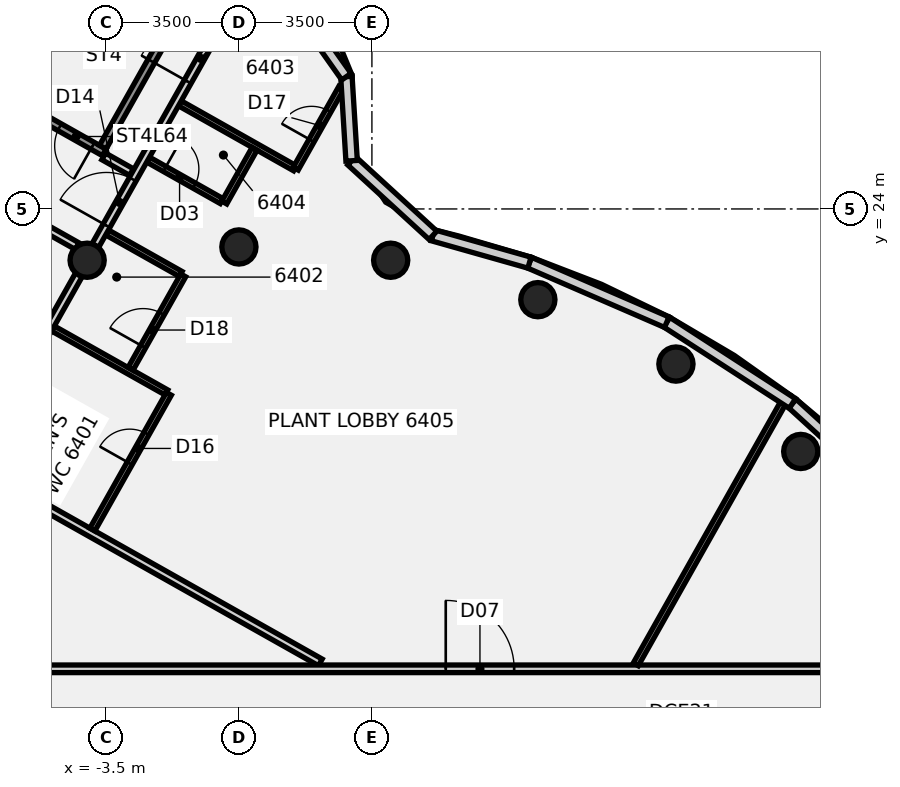
"""IFC4 building model, lengths in metres.
Left out: names, types, materials, properties, quantities, classifications, styles, units other than length and angle.
Written with IfcOpenShell. Run it as: python <this file> out.ifc"""

import sys

from ifc_helpers import new_model, si_unit, direction, frame, frame_2d, origin, origin_2d, place, context, subcontext, project, spatial, rectangle, circle, extrude, element, fill, save


model = new_model("IFC4")
c1 = context("Model", 3, precision=1e-05, world=origin(), true_north=direction((0.0, 1.0)))
c2 = subcontext(c1, "Body", "Model", "MODEL_VIEW")
j1 = project(units=[si_unit("LENGTHUNIT", "METRE"), si_unit("PLANEANGLEUNIT", "RADIAN")], contexts=[c1])
p1 = place(None, origin())
s1 = spatial("IfcSite", under=j1, at=p1, CompositionType="ELEMENT")
p2 = place(p1, origin())
s2 = spatial("IfcBuilding", under=s1, at=p2, CompositionType="ELEMENT")
p3 = place(p2, frame((0.0, 0.0, 252.3)))
s3 = spatial("IfcBuildingStorey", under=s2, at=p3, CompositionType="ELEMENT", Elevation=252.3)
for number, where, z_axis, x_axis in (
    (1, (14.784, 17.619, -0.18), (0.0, 0.0, 1.0), (1.0, 0.0, 0.0)),
    (2, (11.5, 19.919, -0.18), (0.0, 0.0, 1.0), (1.0, 0.0, 0.0)),
    (3, (7.866, 21.613, -0.18), (0.0, 0.0, 1.0), (1.0, 0.0, 0.0)),
    (4, (3.994, 22.651, -0.18), (0.0, 0.0, 1.0), (1.0, 0.0, 0.0)),
    (5, (0.0, 23.0, -0.18), (0.0, 0.0, 1.0), (1.0, 0.0, 0.0)),
    (6, (-3.994, 22.651, -0.18), (0.0, 0.0, 1.0), (1.0, 0.0, 0.0)),
):
    element("IfcColumn", number, at=place(p3, frame(where, z_axis=z_axis, x_axis=x_axis)), inside=s3, PredefinedType="COLUMN", context=c2, shape_type="SweptSolid", body=[
        extrude(circle(Radius=0.45, at=origin_2d()), origin(), (0.0, 0.0, 1.0), 4.54),
    ])
p4 = place(p3, frame((-11.373, 19.686, 0.0), z_axis=(0.0, 0.0, 1.0), x_axis=(0.871198713454, -0.490930546693, 0.0)))
e7 = element("IfcWall", 7, at=p4, inside=s3, PredefinedType="PARTITIONING", context=c2, shape_type="SweptSolid", body=[
    extrude(rectangle(XDim=15.514, YDim=0.2, at=frame_2d((7.757, 0.0))), origin(), (0.0, 0.0, 1.0), 3.66),
])
p5 = place(p3, frame((-7.733, 24.98, 0.0), z_axis=(0.0, 0.0, 1.0), x_axis=(0.871188339902, -0.490948955003, 0.0)))
e8 = element("IfcWall", 8, at=p5, inside=s3, PredefinedType="PARTITIONING", context=c2, shape_type="SweptSolid", body=[
    extrude(rectangle(XDim=3.994, YDim=0.2, at=frame_2d((1.997, 0.0))), origin(), (0.0, 0.0, 1.0), 3.66),
])
p6 = place(p5, frame((1.55, 0.0, 0.0)))
e9 = element("IfcOpeningElement", 9, at=p6, cuts=e8, PredefinedType="OPENING", context=c2, shape_type="SweptSolid", body=[
    extrude(rectangle(XDim=1.4, YDim=2.1, at=frame_2d((0.7, 1.05))), frame((0.0, 0.11, 0.0), z_axis=(0.0, -1.0, 0.0), x_axis=(1.0, 0.0, 0.0)), (0.0, 0.0, 1.0), 0.22),
])
p7 = place(p3, frame((-4.893, 20.854, 0.0), z_axis=(0.0, 0.0, 1.0), x_axis=(0.871287977001, -0.490772107127, 0.0)))
e10 = element("IfcWall", 10, at=p7, inside=s3, PredefinedType="PARTITIONING", context=c2, shape_type="SweptSolid", body=[
    extrude(rectangle(XDim=3.426, YDim=0.15, at=frame_2d((1.713, 0.0))), origin(), (0.0, 0.0, 1.0), 3.66),
])
p8 = place(p3, frame((-3.558, 25.382, 0.0), z_axis=(0.0, 0.0, 1.0), x_axis=(0.87131936668, -0.490716375566, 0.0)))
e11 = element("IfcWall", 11, at=p8, inside=s3, PredefinedType="PARTITIONING", context=c2, shape_type="SweptSolid", body=[
    extrude(rectangle(XDim=0.84, YDim=0.2, at=frame_2d((0.42, 0.0))), origin(), (0.0, 0.0, 1.0), 3.66),
])
p9 = place(p3, frame((-3.469, 23.381, 0.0), z_axis=(0.0, 0.0, 1.0), x_axis=(0.871285294393, -0.490776869641, 0.0)))
e12 = element("IfcWall", 12, at=p9, inside=s3, PredefinedType="PARTITIONING", context=c2, shape_type="SweptSolid", body=[
    extrude(rectangle(XDim=2.225, YDim=0.15, at=frame_2d((1.113, 0.0))), origin(), (0.0, 0.0, 1.0), 3.66),
])
p10 = place(p3, frame((-2.389, 25.298, 0.0), z_axis=(0.0, 0.0, 1.0), x_axis=(0.871090637824, -0.491122286906, 0.0)))
e13 = element("IfcWall", 13, at=p10, inside=s3, PredefinedType="PARTITIONING", context=c2, shape_type="SweptSolid", body=[
    extrude(rectangle(XDim=2.22, YDim=0.15, at=frame_2d((1.11, 0.0))), origin(), (0.0, 0.0, 1.0), 3.66),
])
p11 = place(p10, frame((0.5, 0.0, 0.0)))
e14 = element("IfcOpeningElement", 14, at=p11, cuts=e13, PredefinedType="OPENING", context=c2, shape_type="SweptSolid", body=[
    extrude(rectangle(XDim=0.9, YDim=2.1, at=frame_2d((0.45, 1.05))), frame((0.0, 0.085, 0.0), z_axis=(0.0, -1.0, 0.0), x_axis=(1.0, 0.0, 0.0)), (0.0, 0.0, 1.0), 0.17),
])
p12 = place(p3, frame((-1.554, 26.779, 0.0), z_axis=(0.0, 0.0, 1.0), x_axis=(0.870988474872, -0.491303446599, 0.0)))
e15 = element("IfcWall", 15, at=p12, inside=s3, PredefinedType="PARTITIONING", context=c2, shape_type="SweptSolid", body=[
    extrude(rectangle(XDim=3.48, YDim=0.15, at=frame_2d((1.74, 0.0))), origin(), (0.0, 0.0, 1.0), 3.66),
])
p13 = place(p3, frame((-17.065, 11.9, 0.0), z_axis=(0.0, 0.0, 1.0), x_axis=(1.0, 0.0, 0.0)))
e16 = element("IfcWall", 16, at=p13, inside=s3, PredefinedType="PARTITIONING", context=c2, shape_type="SweptSolid", body=[
    extrude(rectangle(XDim=34.165, YDim=0.2, at=frame_2d((17.083, 0.0))), origin(), (0.0, 0.0, 1.0), 3.66),
])
p14 = place(p13, frame((22.508, 0.0, 0.0)))
e17 = element("IfcOpeningElement", 17, at=p14, cuts=e16, PredefinedType="OPENING", context=c2, shape_type="SweptSolid", body=[
    extrude(rectangle(XDim=1.8, YDim=2.1, at=frame_2d((0.9, 1.05))), frame((0.0, 0.11, 0.0), z_axis=(0.0, -1.0, 0.0), x_axis=(1.0, 0.0, 0.0)), (0.0, 0.0, 1.0), 0.22),
])
p15 = place(p13, frame((10.115, 0.0, 0.0)))
e18 = element("IfcOpeningElement", 18, at=p15, cuts=e16, PredefinedType="OPENING", context=c2, shape_type="SweptSolid", body=[
    extrude(rectangle(XDim=1.8, YDim=2.1, at=frame_2d((0.9, 1.05))), frame((0.0, 0.11, 0.0), z_axis=(0.0, -1.0, 0.0), x_axis=(1.0, 0.0, 0.0)), (0.0, 0.0, 1.0), 0.22),
])
p16 = place(p3, frame((-6.983, 17.348, 0.0), z_axis=(0.0, 0.0, 1.0), x_axis=(0.490949267778, 0.871188163641, 0.0)))
e19 = element("IfcWall", 19, at=p16, inside=s3, PredefinedType="PARTITIONING", context=c2, shape_type="SweptSolid", body=[
    extrude(rectangle(XDim=5.862, YDim=0.2, at=frame_2d((2.931, 0.0))), origin(), (0.0, 0.0, 1.0), 3.66),
])
p17 = place(p3, frame((-3.885, 22.847, 0.0), z_axis=(0.0, 0.0, 1.0), x_axis=(0.490960829695, 0.871181647939, 0.0)))
e20 = element("IfcWall", 20, at=p17, inside=s3, PredefinedType="PARTITIONING", context=c2, shape_type="SweptSolid", body=[
    extrude(rectangle(XDim=7.868, YDim=0.2, at=frame_2d((3.934, 0.0))), origin(), (0.0, 0.0, 1.0), 3.66),
])
p18 = place(p17, frame((0.819, 0.0, 0.0)))
e21 = element("IfcOpeningElement", 21, at=p18, cuts=e20, PredefinedType="OPENING", context=c2, shape_type="SweptSolid", body=[
    extrude(rectangle(XDim=1.4, YDim=2.1, at=frame_2d((0.7, 1.05))), frame((0.0, 0.11, 0.0), z_axis=(0.0, -1.0, 0.0), x_axis=(1.0, 0.0, 0.0)), (0.0, 0.0, 1.0), 0.22),
])
p19 = place(p17, frame((5.17, 0.0, 0.0)))
e22 = element("IfcOpeningElement", 22, at=p19, cuts=e20, PredefinedType="OPENING", context=c2, shape_type="SweptSolid", body=[
    extrude(rectangle(XDim=1.4, YDim=2.1, at=frame_2d((0.7, 1.05))), frame((0.0, 0.11, 0.0), z_axis=(0.0, -1.0, 0.0), x_axis=(1.0, 0.0, 0.0)), (0.0, 0.0, 1.0), 0.22),
])
p20 = place(p3, frame((-3.856, 15.564, 0.0), z_axis=(0.0, 0.0, 1.0), x_axis=(0.49096787186, 0.871177679237, 0.0)))
e23 = element("IfcWall", 23, at=p20, inside=s3, PredefinedType="PARTITIONING", context=c2, shape_type="SweptSolid", body=[
    extrude(rectangle(XDim=4.1, YDim=0.15, at=frame_2d((2.05, 0.0))), origin(), (0.0, 0.0, 1.0), 3.66),
])
p21 = place(p20, frame((2.0, 0.0, 0.0)))
e24 = element("IfcOpeningElement", 24, at=p21, cuts=e23, PredefinedType="OPENING", context=c2, shape_type="SweptSolid", body=[
    extrude(rectangle(XDim=0.9, YDim=2.1, at=frame_2d((0.45, 1.05))), frame((0.0, 0.085, 0.0), z_axis=(0.0, -1.0, 0.0), x_axis=(1.0, 0.0, 0.0)), (0.0, 0.0, 1.0), 0.17),
])
p22 = place(p3, frame((1.495, 25.06, 0.0), z_axis=(0.0, 0.0, 1.0), x_axis=(0.490981386235, 0.87117006283, 0.0)))
e25 = element("IfcWall", 25, at=p22, inside=s3, PredefinedType="PARTITIONING", context=c2, shape_type="SweptSolid", body=[
    extrude(rectangle(XDim=2.446, YDim=0.15, at=frame_2d((1.223, 0.0))), origin(), (0.0, 0.0, 1.0), 3.66),
])
p23 = place(p22, frame((0.85, 0.0, 0.0)))
e26 = element("IfcOpeningElement", 26, at=p23, cuts=e25, PredefinedType="OPENING", context=c2, shape_type="SweptSolid", body=[
    extrude(rectangle(XDim=0.9, YDim=2.1, at=frame_2d((0.45, 1.05))), frame((0.0, 0.085, 0.0), z_axis=(0.0, -1.0, 0.0), x_axis=(1.0, 0.0, 0.0)), (0.0, 0.0, 1.0), 0.17),
])
p24 = place(p3, frame((-2.85, 19.795, 0.0), z_axis=(0.0, 0.0, 1.0), x_axis=(0.490881675971, 0.871226250865, 0.0)))
e27 = element("IfcWall", 27, at=p24, inside=s3, PredefinedType="PARTITIONING", context=c2, shape_type="SweptSolid", body=[
    extrude(rectangle(XDim=2.821, YDim=0.15, at=frame_2d((1.41, 0.0))), origin(), (0.0, 0.0, 1.0), 3.66),
])
p25 = place(p24, frame((0.67, 0.0, 0.0)))
e28 = element("IfcOpeningElement", 28, at=p25, cuts=e27, PredefinedType="OPENING", context=c2, shape_type="SweptSolid", body=[
    extrude(rectangle(XDim=1.0, YDim=2.1, at=frame_2d((0.5, 1.05))), frame((0.0, 0.085, 0.0), z_axis=(0.0, -1.0, 0.0), x_axis=(1.0, 0.0, 0.0)), (0.0, 0.0, 1.0), 0.17),
])
p26 = place(p3, frame((-0.385, 24.168, 0.0), z_axis=(0.0, 0.0, 1.0), x_axis=(0.490967443079, 0.871177920884, 0.0)))
e29 = element("IfcWall", 29, at=p26, inside=s3, PredefinedType="PARTITIONING", context=c2, shape_type="SweptSolid", body=[
    extrude(rectangle(XDim=1.625, YDim=0.15, at=frame_2d((0.812, 0.0))), origin(), (0.0, 0.0, 1.0), 3.66),
])
p27 = place(p3, frame((10.444, 12.018, 0.0), z_axis=(0.0, 0.0, 1.0), x_axis=(0.490955299431, 0.871184764537, 0.0)))
e30 = element("IfcWall", 30, at=p27, inside=s3, PredefinedType="PARTITIONING", context=c2, shape_type="SweptSolid", body=[
    extrude(rectangle(XDim=8.165, YDim=0.15, at=frame_2d((4.083, 0.0))), origin(), (0.0, 0.0, 1.0), 3.66),
])
p28 = place(p3, frame((17.474, 16.226, 0.0), z_axis=(0.0, 0.0, 1.0), x_axis=(-0.738634435884, 0.674106200926, 0.0)))
e31 = element("IfcWall", 31, at=p28, inside=s3, PredefinedType="SOLIDWALL", context=c2, shape_type="SweptSolid", body=[
    extrude(rectangle(XDim=3.938, YDim=0.3, at=frame_2d((1.969, 0.0))), origin(), (0.0, 0.0, 1.0), 4.36),
])
p29 = place(p3, frame((14.565, 18.881, 0.0), z_axis=(0.0, 0.0, 1.0), x_axis=(-0.839498632024, 0.54336180104, 0.0)))
e32 = element("IfcWall", 32, at=p29, inside=s3, PredefinedType="SOLIDWALL", context=c2, shape_type="SweptSolid", body=[
    extrude(rectangle(XDim=3.938, YDim=0.3, at=frame_2d((1.969, 0.0))), origin(), (0.0, 0.0, 1.0), 4.36),
])
p30 = place(p3, frame((11.259, 21.021, 0.0), z_axis=(0.0, 0.0, 1.0), x_axis=(-0.917505110173, 0.397723990735, 0.0)))
e33 = element("IfcWall", 33, at=p30, inside=s3, PredefinedType="SOLIDWALL", context=c2, shape_type="SweptSolid", body=[
    extrude(rectangle(XDim=3.938, YDim=0.3, at=frame_2d((1.969, 0.0))), origin(), (0.0, 0.0, 1.0), 4.36),
])
p31 = place(p3, frame((7.646, 22.587, 0.0), z_axis=(0.0, 0.0, 1.0), x_axis=(-0.962160288524, 0.272484089788, 0.0)))
e34 = element("IfcWall", 34, at=p31, inside=s3, PredefinedType="SOLIDWALL", context=c2, shape_type="SweptSolid", body=[
    extrude(rectangle(XDim=2.639, YDim=0.3, at=frame_2d((1.319, 0.0))), origin(), (0.0, 0.0, 1.0), 4.36),
])
p32 = place(p3, frame((5.107, 23.306, 0.0), z_axis=(0.0, 0.0, 1.0), x_axis=(-0.737248359807, 0.675621829104, 0.0)))
e35 = element("IfcWall", 35, at=p32, inside=s3, PredefinedType="SOLIDWALL", context=c2, shape_type="SweptSolid", body=[
    extrude(rectangle(XDim=2.904, YDim=0.3, at=frame_2d((1.452, 0.0))), origin(), (0.0, 0.0, 1.0), 4.36),
])
p33 = place(p3, frame((2.966, 25.268, 0.0), z_axis=(0.0, 0.0, 1.0), x_axis=(-0.061658520666, 0.998097303287, 0.0)))
e36 = element("IfcWall", 36, at=p33, inside=s3, PredefinedType="SOLIDWALL", context=c2, shape_type="SweptSolid", body=[
    extrude(rectangle(XDim=2.217, YDim=0.3, at=frame_2d((1.109, 0.0))), origin(), (0.0, 0.0, 1.0), 4.36),
])
p34 = place(p3, frame((2.829, 27.481, 0.0), z_axis=(0.0, 0.0, 1.0), x_axis=(-0.577459771893, 0.816419139808, 0.0)))
e37 = element("IfcWall", 37, at=p34, inside=s3, PredefinedType="SOLIDWALL", context=c2, shape_type="SweptSolid", body=[
    extrude(rectangle(XDim=1.604, YDim=0.3, at=frame_2d((0.802, 0.0))), origin(), (0.0, 0.0, 1.0), 4.36),
])
p35 = place(p3, frame((-3.544, 25.489, -0.18), z_axis=(0.0, 0.0, 1.0), x_axis=(-0.871189898328, 0.490946189567, 0.0)))
e38 = element("IfcWall", 38, at=p35, inside=s3, PredefinedType="SHEAR", context=c2, shape_type="SweptSolid", body=[
    extrude(rectangle(XDim=6.7, YDim=0.2, at=frame_2d((3.35, 0.0))), origin(), (0.0, 0.0, 1.0), 3.944),
])
p36 = place(p35, frame((0.35, 0.0, 0.0)))
e39 = element("IfcOpeningElement", 39, at=p36, cuts=e38, PredefinedType="OPENING", context=c2, shape_type="SweptSolid", body=[
    extrude(rectangle(XDim=1.0, YDim=2.1, at=frame_2d((0.5, 1.05))), frame((0.0, 0.11, 0.0), z_axis=(0.0, -1.0, 0.0), x_axis=(1.0, 0.0, 0.0)), (0.0, 0.0, 1.0), 0.22),
])
p37 = place(p3, frame((-2.01, 28.413, -0.18), z_axis=(0.0, 0.0, 1.0), x_axis=(-0.490945688221, -0.871190180854, 0.0)))
e40 = element("IfcWall", 40, at=p37, inside=s3, PredefinedType="SHEAR", context=c2, shape_type="SweptSolid", body=[
    extrude(rectangle(XDim=3.2, YDim=0.2, at=frame_2d((1.6, 0.0))), origin(), (0.0, 0.0, 1.0), 4.54),
])
p38 = place(p11, origin())
e41 = element("IfcDoor", 41, at=p38, inside=s3, OperationType="SINGLE_SWING_RIGHT", PredefinedType="DOOR", context=c2, shape_type="SweptSolid", body=[
    extrude(rectangle(XDim=0.9, YDim=2.1, at=frame_2d((0.45, 1.05))), frame((0.0, 0.025, 0.0), z_axis=(0.0, -1.0, 0.0), x_axis=(1.0, 0.0, 0.0)), (0.0, 0.0, 1.0), 0.05),
])
fill(e14, e41)
p39 = place(p14, frame((1.8, 0.0, 0.0), z_axis=(0.0, 0.0, 1.0), x_axis=(-1.0, 0.0, 0.0)))
e42 = element("IfcDoor", 42, at=p39, inside=s3, OperationType="DOUBLE_DOOR_SINGLE_SWING", PredefinedType="DOOR", context=c2, shape_type="SweptSolid", body=[
    extrude(rectangle(XDim=1.8, YDim=2.1, at=frame_2d((0.9, 1.05))), frame((0.0, 0.025, 0.0), z_axis=(0.0, -1.0, 0.0), x_axis=(1.0, 0.0, 0.0)), (0.0, 0.0, 1.0), 0.05),
])
fill(e17, e42)
p40 = place(p18, frame((1.4, 0.0, 0.0), z_axis=(0.0, 0.0, 1.0), x_axis=(-1.0, 0.0, 0.0)))
e43 = element("IfcDoor", 43, at=p40, inside=s3, OperationType="DOUBLE_DOOR_SINGLE_SWING", PredefinedType="DOOR", context=c2, shape_type="SweptSolid", body=[
    extrude(rectangle(XDim=1.4, YDim=2.1, at=frame_2d((0.7, 1.05))), frame((0.0, 0.025, 0.0), z_axis=(0.0, -1.0, 0.0), x_axis=(1.0, 0.0, 0.0)), (0.0, 0.0, 1.0), 0.05),
])
fill(e21, e43)
p41 = place(p19, origin())
e44 = element("IfcDoor", 44, at=p41, inside=s3, OperationType="DOUBLE_DOOR_SINGLE_SWING", PredefinedType="DOOR", context=c2, shape_type="SweptSolid", body=[
    extrude(rectangle(XDim=1.4, YDim=2.1, at=frame_2d((0.7, 1.05))), frame((0.0, 0.025, 0.0), z_axis=(0.0, -1.0, 0.0), x_axis=(1.0, 0.0, 0.0)), (0.0, 0.0, 1.0), 0.05),
])
fill(e22, e44)
p42 = place(p21, origin())
e45 = element("IfcDoor", 45, at=p42, inside=s3, OperationType="SINGLE_SWING_LEFT", PredefinedType="DOOR", context=c2, shape_type="SweptSolid", body=[
    extrude(rectangle(XDim=0.9, YDim=2.1, at=frame_2d((0.45, 1.05))), frame((0.0, 0.025, 0.0), z_axis=(0.0, -1.0, 0.0), x_axis=(1.0, 0.0, 0.0)), (0.0, 0.0, 1.0), 0.05),
])
fill(e24, e45)
p43 = place(p23, origin())
e46 = element("IfcDoor", 46, at=p43, inside=s3, OperationType="SINGLE_SWING_LEFT", PredefinedType="DOOR", context=c2, shape_type="SweptSolid", body=[
    extrude(rectangle(XDim=0.9, YDim=2.1, at=frame_2d((0.45, 1.05))), frame((0.0, 0.025, 0.0), z_axis=(0.0, -1.0, 0.0), x_axis=(1.0, 0.0, 0.0)), (0.0, 0.0, 1.0), 0.05),
])
fill(e26, e46)
p44 = place(p25, origin())
e47 = element("IfcDoor", 47, at=p44, inside=s3, OperationType="SINGLE_SWING_RIGHT", PredefinedType="DOOR", context=c2, shape_type="SweptSolid", body=[
    extrude(rectangle(XDim=1.0, YDim=2.1, at=frame_2d((0.5, 1.05))), frame((0.0, 0.025, 0.0), z_axis=(0.0, -1.0, 0.0), x_axis=(1.0, 0.0, 0.0)), (0.0, 0.0, 1.0), 0.05),
])
fill(e28, e47)
p45 = place(p36, origin())
e48 = element("IfcDoor", 48, at=p45, inside=s3, OperationType="SINGLE_SWING_LEFT", PredefinedType="DOOR", context=c2, shape_type="SweptSolid", body=[
    extrude(rectangle(XDim=1.0, YDim=2.1, at=frame_2d((0.5, 1.05))), frame((0.0, 0.025, 0.0), z_axis=(0.0, -1.0, 0.0), x_axis=(1.0, 0.0, 0.0)), (0.0, 0.0, 1.0), 0.05),
])
fill(e39, e48)
save(model, sys.argv[1])
